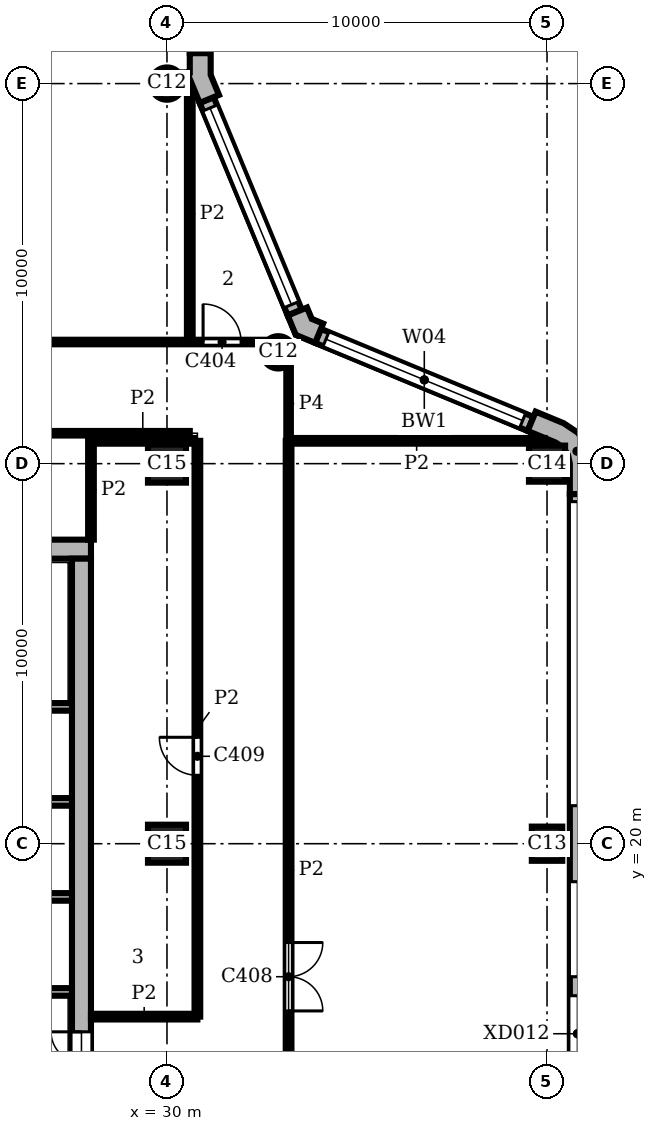
"""IFC4 building model, lengths in metres.
Left out: names, types, materials, properties, quantities, classifications, styles, units other than length and angle.
Written with IfcOpenShell. Run it as: python <this file> out.ifc"""

import sys

from ifc_helpers import new_model, si_unit, direction, frame, frame_2d, origin, origin_2d, place, context, subcontext, project, spatial, polyline, rectangle, circle, outline, extrude, element, fill, save


model = new_model("IFC4")
c1 = context("Model", 3, precision=1e-05, world=origin(), true_north=direction((0.0, 1.0)))
c2 = subcontext(c1, "Body", "Model", "MODEL_VIEW")
j1 = project(units=[si_unit("LENGTHUNIT", "METRE"), si_unit("PLANEANGLEUNIT", "RADIAN")], contexts=[c1])
p1 = place(None, origin())
s1 = spatial("IfcSite", under=j1, at=p1, CompositionType="ELEMENT")
p2 = place(p1, origin())
s2 = spatial("IfcBuilding", under=s1, at=p2, CompositionType="ELEMENT")
p3 = place(p2, frame((0.0, 0.0, 278.7)))
s3 = spatial("IfcBuildingStorey", under=s2, at=p3, CompositionType="ELEMENT", Elevation=278.7)
p4 = place(p3, frame((40.0, 20.0, 0.0), z_axis=(0.0, 0.0, 1.0), x_axis=(0.0, 1.0, 0.0)))
e1 = element("IfcColumn", 1, at=p4, inside=s3, PredefinedType="COLUMN", context=c2, shape_type="SweptSolid", body=[
    extrude(rectangle(XDim=0.9, YDim=0.8, at=origin_2d()), origin(), (0.0, 0.0, 1.0), 3.9),
])
p5 = place(p3, frame((40.0, 30.0, 0.0), z_axis=(0.0, 0.0, 1.0), x_axis=(1.0, 0.0, 0.0)))
e2 = element("IfcColumn", 2, at=p5, inside=s3, PredefinedType="COLUMN", context=c2, shape_type="SweptSolid", body=[
    extrude(rectangle(XDim=0.95, YDim=0.95, at=origin_2d()), origin(), (0.0, 0.0, 1.0), 3.9),
])
for number, where, z_axis, x_axis in (
    (3, (32.929, 32.929, 0.0), (0.0, 0.0, 1.0), (1.0, 0.0, 0.0)),
    (4, (30.0, 40.0, 0.0), (0.0, 0.0, 1.0), (1.0, 0.0, 0.0)),
):
    element("IfcColumn", number, at=place(p3, frame(where, z_axis=z_axis, x_axis=x_axis)), inside=s3, PredefinedType="COLUMN", context=c2, shape_type="SweptSolid", body=[
        extrude(circle(Radius=0.425, at=origin_2d()), origin(), (0.0, 0.0, 1.0), 3.9),
    ])
for number, where, z_axis, x_axis in (
    (5, (30.0, 20.0, 0.0), (0.0, 0.0, 1.0), (1.0, 0.0, 0.0)),
    (6, (30.0, 30.0, 0.0), (0.0, 0.0, 1.0), (1.0, 0.0, 0.0)),
):
    element("IfcColumn", number, at=place(p3, frame(where, z_axis=z_axis, x_axis=x_axis)), inside=s3, PredefinedType="COLUMN", context=c2, shape_type="SweptSolid", body=[
        extrude(rectangle(XDim=1.0, YDim=1.0, at=origin_2d()), origin(), (0.0, 0.0, 1.0), 3.9),
    ])
p6 = place(p3, frame((27.75, 8.5, 0.0), z_axis=(0.0, 0.0, 1.0), x_axis=(0.0, 1.0, 0.0)))
e7 = element("IfcWall", 7, at=p6, inside=s3, PredefinedType="SHEAR", context=c2, shape_type="SweptSolid", body=[
    extrude(rectangle(XDim=19.0, YDim=0.5, at=frame_2d((9.5, 0.0))), origin(), (0.0, 0.0, 1.0), 3.9),
])
p7 = place(p6, frame((4.95, 0.0, 0.0)))
e8 = element("IfcOpeningElement", 8, at=p7, cuts=e7, PredefinedType="OPENING", context=c2, shape_type="SweptSolid", body=[
    extrude(rectangle(XDim=1.6, YDim=2.1, at=frame_2d((0.8, 1.05))), frame((0.0, 0.26, 0.0), z_axis=(0.0, -1.0, 0.0), x_axis=(1.0, 0.0, 0.0)), (0.0, 0.0, 1.0), 0.52),
])
p8 = place(p3, frame((28.0, 27.75, 0.0), z_axis=(0.0, 0.0, 1.0), x_axis=(-1.0, 0.0, 0.0)))
e9 = element("IfcWall", 9, at=p8, inside=s3, PredefinedType="SHEAR", context=c2, shape_type="SweptSolid", body=[
    extrude(rectangle(XDim=20.0, YDim=0.5, at=frame_2d((10.0, 0.0))), origin(), (0.0, 0.0, 1.0), 3.9),
])
p9 = place(p3, origin())
e10 = element("IfcWall", 10, at=p9, inside=s3, PredefinedType="SOLIDWALL", context=c2, shape_type="SweptSolid", body=[
    extrude(outline(polyline([(41.0, 29.2), (41.15, 29.2), (41.15, 30.0), (41.062, 30.44), (40.813, 30.813), (40.44, 31.062), (39.701, 31.369), (39.644, 31.23), (39.49, 30.861), (40.229, 30.554), (40.424, 30.424), (40.554, 30.229), (40.6, 30.0), (40.6, 29.2), (41.0, 29.2)])), origin(), (0.0, 0.0, 1.0), 3.9),
])
e11 = element("IfcWall", 11, at=p9, inside=s3, PredefinedType="SOLIDWALL", context=c2, shape_type="SweptSolid", body=[
    extrude(outline(polyline([(34.051, 33.547), (34.108, 33.685), (33.809, 33.809), (33.685, 34.108), (33.547, 34.051), (33.177, 33.898), (33.388, 33.388), (33.898, 33.177), (34.051, 33.547)])), origin(), (0.0, 0.0, 1.0), 3.9),
])
e12 = element("IfcWall", 12, at=p9, inside=s3, PredefinedType="SOLIDWALL", context=c2, shape_type="SweptSolid", body=[
    extrude(outline(polyline([(30.62, 39.995), (30.62, 40.071), (30.861, 39.49), (31.23, 39.644), (31.369, 39.701), (31.15, 40.229), (31.15, 40.8), (31.0, 40.8), (30.6, 40.8), (30.6, 40.295), (30.425, 40.295), (30.425, 39.995), (30.62, 39.995)])), origin(), (0.0, 0.0, 1.0), 3.9),
])
p10 = place(p3, frame((40.8, 0.8, 0.0), z_axis=(0.0, 0.0, 1.0), x_axis=(0.0, 1.0, 0.0)))
e13 = element("IfcWall", 13, at=p10, inside=s3, PredefinedType="SOLIDWALL", context=c2, shape_type="SweptSolid", body=[
    extrude(rectangle(XDim=28.4, YDim=0.4, at=frame_2d((14.2, 0.0))), origin(), (0.0, 0.0, 1.0), 3.9),
])
p11 = place(p10, frame((0.2, 0.0, 0.9)))
e14 = element("IfcOpeningElement", 14, at=p11, cuts=e13, PredefinedType="OPENING", context=c2, shape_type="SweptSolid", body=[
    extrude(rectangle(XDim=8.0, YDim=2.35, at=frame_2d((4.0, 1.175))), frame((0.0, 0.21, 0.0), z_axis=(0.0, -1.0, 0.0), x_axis=(1.0, 0.0, 0.0)), (0.0, 0.0, 1.0), 0.42),
])
p12 = place(p10, frame((10.2, 0.0, 0.9)))
e15 = element("IfcOpeningElement", 15, at=p12, cuts=e13, PredefinedType="OPENING", context=c2, shape_type="SweptSolid", body=[
    extrude(rectangle(XDim=2.5, YDim=2.35, at=frame_2d((1.25, 1.175))), frame((0.0, 0.21, 0.0), z_axis=(0.0, -1.0, 0.0), x_axis=(1.0, 0.0, 0.0)), (0.0, 0.0, 1.0), 0.42),
])
p13 = place(p10, frame((13.2, 0.0, 0.0)))
e16 = element("IfcOpeningElement", 16, at=p13, cuts=e13, PredefinedType="OPENING", context=c2, shape_type="SweptSolid", body=[
    extrude(rectangle(XDim=2.0, YDim=2.4, at=frame_2d((1.0, 1.2))), frame((0.0, 0.21, 0.0), z_axis=(0.0, -1.0, 0.0), x_axis=(1.0, 0.0, 0.0)), (0.0, 0.0, 1.0), 0.42),
])
p14 = place(p10, frame((15.7, 0.0, 0.9)))
e17 = element("IfcOpeningElement", 17, at=p14, cuts=e13, PredefinedType="OPENING", context=c2, shape_type="SweptSolid", body=[
    extrude(rectangle(XDim=2.5, YDim=2.35, at=frame_2d((1.25, 1.175))), frame((0.0, 0.21, 0.0), z_axis=(0.0, -1.0, 0.0), x_axis=(1.0, 0.0, 0.0)), (0.0, 0.0, 1.0), 0.42),
])
p15 = place(p10, frame((20.2, 0.0, 0.9)))
e18 = element("IfcOpeningElement", 18, at=p15, cuts=e13, PredefinedType="OPENING", context=c2, shape_type="SweptSolid", body=[
    extrude(rectangle(XDim=8.0, YDim=2.35, at=frame_2d((4.0, 1.175))), frame((0.0, 0.21, 0.0), z_axis=(0.0, -1.0, 0.0), x_axis=(1.0, 0.0, 0.0)), (0.0, 0.0, 1.0), 0.42),
])
p16 = place(p3, frame((39.567, 31.045, 0.0), z_axis=(0.0, 0.0, 1.0), x_axis=(-0.923891000409, 0.382655745237, 0.0)))
e19 = element("IfcWall", 19, at=p16, inside=s3, PredefinedType="SOLIDWALL", context=c2, shape_type="SweptSolid", body=[
    extrude(rectangle(XDim=6.053, YDim=0.4, at=frame_2d((3.027, 0.0))), origin(), (0.0, 0.0, 1.0), 3.9),
])
p17 = place(p16, frame((0.227, 0.0, 0.9)))
e20 = element("IfcOpeningElement", 20, at=p17, cuts=e19, PredefinedType="OPENING", context=c2, shape_type="SweptSolid", body=[
    extrude(rectangle(XDim=5.6, YDim=2.35, at=frame_2d((2.8, 1.175))), frame((0.0, 0.21, 0.0), z_axis=(0.0, -1.0, 0.0), x_axis=(1.0, 0.0, 0.0)), (0.0, 0.0, 1.0), 0.42),
])
p18 = place(p3, frame((33.362, 33.974, 0.0), z_axis=(0.0, 0.0, 1.0), x_axis=(-0.382655745237, 0.923891000409, 0.0)))
e21 = element("IfcWall", 21, at=p18, inside=s3, PredefinedType="SOLIDWALL", context=c2, shape_type="SweptSolid", body=[
    extrude(rectangle(XDim=6.053, YDim=0.4, at=frame_2d((3.027, 0.0))), origin(), (0.0, 0.0, 1.0), 3.9),
])
p19 = place(p18, frame((0.227, 0.0, 0.9)))
e22 = element("IfcOpeningElement", 22, at=p19, cuts=e21, PredefinedType="OPENING", context=c2, shape_type="SweptSolid", body=[
    extrude(rectangle(XDim=5.6, YDim=2.35, at=frame_2d((2.8, 1.175))), frame((0.0, 0.21, 0.0), z_axis=(0.0, -1.0, 0.0), x_axis=(1.0, 0.0, 0.0)), (0.0, 0.0, 1.0), 0.42),
])
p20 = place(p3, frame((30.8, 40.8, 0.0), z_axis=(0.0, 0.0, 1.0), x_axis=(0.0, 1.0, 0.0)))
e23 = element("IfcWall", 23, at=p20, inside=s3, PredefinedType="SOLIDWALL", context=c2, shape_type="SweptSolid", body=[
    extrude(rectangle(XDim=18.4, YDim=0.4, at=frame_2d((9.2, 0.0))), origin(), (0.0, 0.0, 1.0), 3.9),
])
p21 = place(p20, frame((0.2, 0.0, 0.9)))
e24 = element("IfcOpeningElement", 24, at=p21, cuts=e23, PredefinedType="OPENING", context=c2, shape_type="SweptSolid", body=[
    extrude(rectangle(XDim=8.0, YDim=2.35, at=frame_2d((4.0, 1.175))), frame((0.0, 0.21, 0.0), z_axis=(0.0, -1.0, 0.0), x_axis=(1.0, 0.0, 0.0)), (0.0, 0.0, 1.0), 0.42),
])
p22 = place(p20, frame((10.2, 0.0, 0.9)))
e25 = element("IfcOpeningElement", 25, at=p22, cuts=e23, PredefinedType="OPENING", context=c2, shape_type="SweptSolid", body=[
    extrude(rectangle(XDim=8.0, YDim=2.35, at=frame_2d((4.0, 1.175))), frame((0.0, 0.21, 0.0), z_axis=(0.0, -1.0, 0.0), x_axis=(1.0, 0.0, 0.0)), (0.0, 0.0, 1.0), 0.42),
])
for number, where, z_axis, x_axis in (
    (26, (24.3, 16.1, 0.0), (0.0, 0.0, 1.0), (1.0, 0.0, 0.0)),
    (27, (24.3, 18.6, 0.0), (0.0, 0.0, 1.0), (1.0, 0.0, 0.0)),
    (28, (24.3, 21.1, 0.0), (0.0, 0.0, 1.0), (1.0, 0.0, 0.0)),
):
    element("IfcWall", number, at=place(p3, frame(where, z_axis=z_axis, x_axis=x_axis)), inside=s3, PredefinedType="SHEAR", context=c2, shape_type="SweptSolid", body=[
        extrude(rectangle(XDim=3.2, YDim=0.2, at=frame_2d((1.6, 0.0))), origin(), (0.0, 0.0, 1.0), 3.58),
    ])
p23 = place(p3, frame((13.8, 23.6, 0.0), z_axis=(0.0, 0.0, 1.0), x_axis=(1.0, 0.0, 0.0)))
e29 = element("IfcWall", 29, at=p23, inside=s3, PredefinedType="SHEAR", context=c2, shape_type="SweptSolid", body=[
    extrude(rectangle(XDim=13.7, YDim=0.2, at=frame_2d((6.85, 0.0))), origin(), (0.0, 0.0, 1.0), 3.58),
])
p24 = place(p23, frame((2.4, 0.0, 0.0)))
e30 = element("IfcOpeningElement", 30, at=p24, cuts=e29, PredefinedType="OPENING", context=c2, shape_type="SweptSolid", body=[
    extrude(rectangle(XDim=1.1, YDim=2.1, at=frame_2d((0.55, 1.05))), frame((0.0, 0.11, 0.0), z_axis=(0.0, -1.0, 0.0), x_axis=(1.0, 0.0, 0.0)), (0.0, 0.0, 1.0), 0.22),
])
p25 = place(p23, frame((4.9, 0.0, 0.0)))
e31 = element("IfcOpeningElement", 31, at=p25, cuts=e29, PredefinedType="OPENING", context=c2, shape_type="SweptSolid", body=[
    extrude(rectangle(XDim=1.1, YDim=2.1, at=frame_2d((0.55, 1.05))), frame((0.0, 0.11, 0.0), z_axis=(0.0, -1.0, 0.0), x_axis=(1.0, 0.0, 0.0)), (0.0, 0.0, 1.0), 0.22),
])
p26 = place(p23, frame((0.15, 0.0, 0.0)))
e32 = element("IfcOpeningElement", 32, at=p26, cuts=e29, PredefinedType="OPENING", context=c2, shape_type="SweptSolid", body=[
    extrude(rectangle(XDim=1.0, YDim=2.1, at=frame_2d((0.5, 1.05))), frame((0.0, 0.11, 0.0), z_axis=(0.0, -1.0, 0.0), x_axis=(1.0, 0.0, 0.0)), (0.0, 0.0, 1.0), 0.22),
])
p27 = place(p3, frame((28.0, 28.0, 0.0), z_axis=(0.0, 0.0, 1.0), x_axis=(0.0, 1.0, 0.0)))
e33 = element("IfcWall", 33, at=p27, inside=s3, PredefinedType="PARTITIONING", context=c2, shape_type="SweptSolid", body=[
    extrude(rectangle(XDim=2.598, YDim=0.15, at=frame_2d((1.299, 0.0))), origin(), (0.0, 0.0, 1.0), 3.58),
])
p28 = place(p3, frame((30.6, 33.2, 0.0), z_axis=(0.0, 0.0, 1.0), x_axis=(0.0, 1.0, 0.0)))
e34 = element("IfcWall", 34, at=p28, inside=s3, PredefinedType="PARTITIONING", context=c2, shape_type="SweptSolid", body=[
    extrude(rectangle(XDim=6.738, YDim=0.15, at=frame_2d((3.369, 0.0))), origin(), (0.0, 0.0, 1.0), 3.58),
])
p29 = place(p3, frame((30.8, 15.45, 0.0), z_axis=(0.0, 0.0, 1.0), x_axis=(0.0, 1.0, 0.0)))
e35 = element("IfcWall", 35, at=p29, inside=s3, PredefinedType="PARTITIONING", context=c2, shape_type="SweptSolid", body=[
    extrude(rectangle(XDim=15.15, YDim=0.15, at=frame_2d((7.575, 0.0))), origin(), (0.0, 0.0, 1.0), 3.58),
])
p30 = place(p29, frame((6.35, 0.0, 0.0)))
e36 = element("IfcOpeningElement", 36, at=p30, cuts=e35, PredefinedType="OPENING", context=c2, shape_type="SweptSolid", body=[
    extrude(rectangle(XDim=1.0, YDim=2.1, at=frame_2d((0.5, 1.05))), frame((0.0, 0.085, 0.0), z_axis=(0.0, -1.0, 0.0), x_axis=(1.0, 0.0, 0.0)), (0.0, 0.0, 1.0), 0.17),
])
p31 = place(p3, frame((33.2, 8.0, 0.0), z_axis=(0.0, 0.0, 1.0), x_axis=(0.0, 1.0, 0.0)))
e37 = element("IfcWall", 37, at=p31, inside=s3, PredefinedType="PARTITIONING", context=c2, shape_type="SweptSolid", body=[
    extrude(rectangle(XDim=22.6, YDim=0.15, at=frame_2d((11.3, 0.0))), origin(), (0.0, 0.0, 1.0), 3.58),
])
p32 = place(p31, frame((7.6, 0.0, 0.0)))
e38 = element("IfcOpeningElement", 38, at=p32, cuts=e37, PredefinedType="OPENING", context=c2, shape_type="SweptSolid", body=[
    extrude(rectangle(XDim=1.8, YDim=2.1, at=frame_2d((0.9, 1.05))), frame((0.0, 0.085, 0.0), z_axis=(0.0, -1.0, 0.0), x_axis=(1.0, 0.0, 0.0)), (0.0, 0.0, 1.0), 0.17),
])
p33 = place(p3, frame((28.0, 15.45, 0.0), z_axis=(0.0, 0.0, 1.0), x_axis=(1.0, 0.0, 0.0)))
e39 = element("IfcWall", 39, at=p33, inside=s3, PredefinedType="PARTITIONING", context=c2, shape_type="SweptSolid", body=[
    extrude(rectangle(XDim=2.8, YDim=0.15, at=frame_2d((1.4, 0.0))), origin(), (0.0, 0.0, 1.0), 3.58),
])
p34 = place(p3, frame((28.002, 30.6, 0.0), z_axis=(0.0, 0.0, 1.0), x_axis=(1.0, 0.0, 0.0)))
e40 = element("IfcWall", 40, at=p34, inside=s3, PredefinedType="PARTITIONING", context=c2, shape_type="SweptSolid", body=[
    extrude(rectangle(XDim=2.723, YDim=0.15, at=frame_2d((1.362, 0.0))), origin(), (0.0, 0.0, 1.0), 3.58),
])
p35 = place(p3, frame((33.2, 30.6, 0.0), z_axis=(0.0, 0.0, 1.0), x_axis=(1.0, 0.0, 0.0)))
e41 = element("IfcWall", 41, at=p35, inside=s3, PredefinedType="PARTITIONING", context=c2, shape_type="SweptSolid", body=[
    extrude(rectangle(XDim=6.738, YDim=0.15, at=frame_2d((3.369, 0.0))), origin(), (0.0, 0.0, 1.0), 3.58),
])
p36 = place(p3, frame((33.2, 30.6, 0.0), z_axis=(0.0, 0.0, 1.0), x_axis=(0.0, 1.0, 0.0)))
e42 = element("IfcWall", 42, at=p36, inside=s3, PredefinedType="PARTITIONING", context=c2, shape_type="SweptSolid", body=[
    extrude(rectangle(XDim=1.96, YDim=0.12, at=frame_2d((0.98, 0.0))), origin(), (0.0, 0.0, 1.0), 3.58),
])
p37 = place(p3, frame((13.802, 30.8, 0.0), z_axis=(0.0, 0.0, 1.0), x_axis=(1.0, 0.0, 0.0)))
e43 = element("IfcWall", 43, at=p37, inside=s3, PredefinedType="PARTITIONING", context=c2, shape_type="SweptSolid", body=[
    extrude(rectangle(XDim=16.798, YDim=0.12, at=frame_2d((8.399, 0.0))), origin(), (0.0, 0.0, 1.0), 3.58),
])
p38 = place(p37, frame((9.1, 0.0, 0.0)))
e44 = element("IfcOpeningElement", 44, at=p38, cuts=e43, PredefinedType="OPENING", context=c2, shape_type="SweptSolid", body=[
    extrude(rectangle(XDim=1.0, YDim=2.1, at=frame_2d((0.5, 1.05))), frame((0.0, 0.07, 0.0), z_axis=(0.0, -1.0, 0.0), x_axis=(1.0, 0.0, 0.0)), (0.0, 0.0, 1.0), 0.14),
])
p39 = place(p3, frame((16.2, 33.2, 0.0), z_axis=(0.0, 0.0, 1.0), x_axis=(1.0, 0.0, 0.0)))
e45 = element("IfcWall", 45, at=p39, inside=s3, PredefinedType="PARTITIONING", context=c2, shape_type="SweptSolid", body=[
    extrude(rectangle(XDim=16.36, YDim=0.12, at=frame_2d((8.18, 0.0))), origin(), (0.0, 0.0, 1.0), 3.58),
])
p40 = place(p39, frame((14.75, 0.0, 0.0)))
e46 = element("IfcOpeningElement", 46, at=p40, cuts=e45, PredefinedType="OPENING", context=c2, shape_type="SweptSolid", body=[
    extrude(rectangle(XDim=1.0, YDim=2.1, at=frame_2d((0.5, 1.05))), frame((0.0, 0.07, 0.0), z_axis=(0.0, -1.0, 0.0), x_axis=(1.0, 0.0, 0.0)), (0.0, 0.0, 1.0), 0.14),
])
p41 = place(p13, frame((2.0, 0.0, 0.0), z_axis=(0.0, 0.0, 1.0), x_axis=(-1.0, 0.0, 0.0)))
e47 = element("IfcDoor", 47, at=p41, inside=s3, OperationType="DOUBLE_DOOR_DOUBLE_SWING", PredefinedType="DOOR", context=c2, shape_type="SweptSolid", body=[
    extrude(rectangle(XDim=2.0, YDim=2.4, at=frame_2d((1.0, 1.2))), frame((0.0, 0.025, 0.0), z_axis=(0.0, -1.0, 0.0), x_axis=(1.0, 0.0, 0.0)), (0.0, 0.0, 1.0), 0.05),
])
fill(e16, e47)
p42 = place(p14, origin())
e48 = element("IfcWindow", 48, at=p42, inside=s3, PartitioningType="SINGLE_PANEL", PredefinedType="WINDOW", context=c2, shape_type="SweptSolid", body=[
    extrude(rectangle(XDim=2.5, YDim=2.35, at=frame_2d((1.25, 1.175))), frame((0.0, 0.16, 0.0), z_axis=(0.0, -1.0, 0.0), x_axis=(1.0, 0.0, 0.0)), (0.0, 0.0, 1.0), 0.06),
])
fill(e17, e48)
p43 = place(p15, origin())
e49 = element("IfcWindow", 49, at=p43, inside=s3, PartitioningType="SINGLE_PANEL", PredefinedType="WINDOW", context=c2, shape_type="SweptSolid", body=[
    extrude(rectangle(XDim=8.0, YDim=2.35, at=frame_2d((4.0, 1.175))), frame((0.0, 0.16, 0.0), z_axis=(0.0, -1.0, 0.0), x_axis=(1.0, 0.0, 0.0)), (0.0, 0.0, 1.0), 0.06),
])
fill(e18, e49)
p44 = place(p17, origin())
e50 = element("IfcWindow", 50, at=p44, inside=s3, PartitioningType="SINGLE_PANEL", PredefinedType="WINDOW", context=c2, shape_type="SweptSolid", body=[
    extrude(rectangle(XDim=5.6, YDim=2.35, at=frame_2d((2.8, 1.175))), frame((0.0, 0.16, 0.0), z_axis=(0.0, -1.0, 0.0), x_axis=(1.0, 0.0, 0.0)), (0.0, 0.0, 1.0), 0.06),
])
fill(e20, e50)
p45 = place(p19, origin())
e51 = element("IfcWindow", 51, at=p45, inside=s3, PartitioningType="SINGLE_PANEL", PredefinedType="WINDOW", context=c2, shape_type="SweptSolid", body=[
    extrude(rectangle(XDim=5.6, YDim=2.35, at=frame_2d((2.8, 1.175))), frame((0.0, 0.16, 0.0), z_axis=(0.0, -1.0, 0.0), x_axis=(1.0, 0.0, 0.0)), (0.0, 0.0, 1.0), 0.06),
])
fill(e22, e51)
p46 = place(p7, origin())
e52 = element("IfcDoor", 52, at=p46, inside=s3, OperationType="DOUBLE_DOOR_SINGLE_SWING", PredefinedType="DOOR", context=c2, shape_type="SweptSolid", body=[
    extrude(rectangle(XDim=1.6, YDim=2.1, at=frame_2d((0.8, 1.05))), frame((0.0, 0.025, 0.0), z_axis=(0.0, -1.0, 0.0), x_axis=(1.0, 0.0, 0.0)), (0.0, 0.0, 1.0), 0.05),
])
fill(e8, e52)
p47 = place(p40, origin())
e53 = element("IfcDoor", 53, at=p47, inside=s3, OperationType="SINGLE_SWING_LEFT", PredefinedType="DOOR", context=c2, shape_type="SweptSolid", body=[
    extrude(rectangle(XDim=1.0, YDim=2.1, at=frame_2d((0.5, 1.05))), frame((0.0, 0.025, 0.0), z_axis=(0.0, -1.0, 0.0), x_axis=(1.0, 0.0, 0.0)), (0.0, 0.0, 1.0), 0.05),
])
fill(e46, e53)
p48 = place(p32, frame((1.8, 0.0, 0.0), z_axis=(0.0, 0.0, 1.0), x_axis=(-1.0, 0.0, 0.0)))
e54 = element("IfcDoor", 54, at=p48, inside=s3, OperationType="DOUBLE_DOOR_SINGLE_SWING", PredefinedType="DOOR", context=c2, shape_type="SweptSolid", body=[
    extrude(rectangle(XDim=1.8, YDim=2.1, at=frame_2d((0.9, 1.05))), frame((0.0, 0.025, 0.0), z_axis=(0.0, -1.0, 0.0), x_axis=(1.0, 0.0, 0.0)), (0.0, 0.0, 1.0), 0.05),
])
fill(e38, e54)
p49 = place(p30, origin())
e55 = element("IfcDoor", 55, at=p49, inside=s3, OperationType="SINGLE_SWING_RIGHT", PredefinedType="DOOR", context=c2, shape_type="SweptSolid", body=[
    extrude(rectangle(XDim=1.0, YDim=2.1, at=frame_2d((0.5, 1.05))), frame((0.0, 0.025, 0.0), z_axis=(0.0, -1.0, 0.0), x_axis=(1.0, 0.0, 0.0)), (0.0, 0.0, 1.0), 0.05),
])
fill(e36, e55)
save(model, sys.argv[1])
